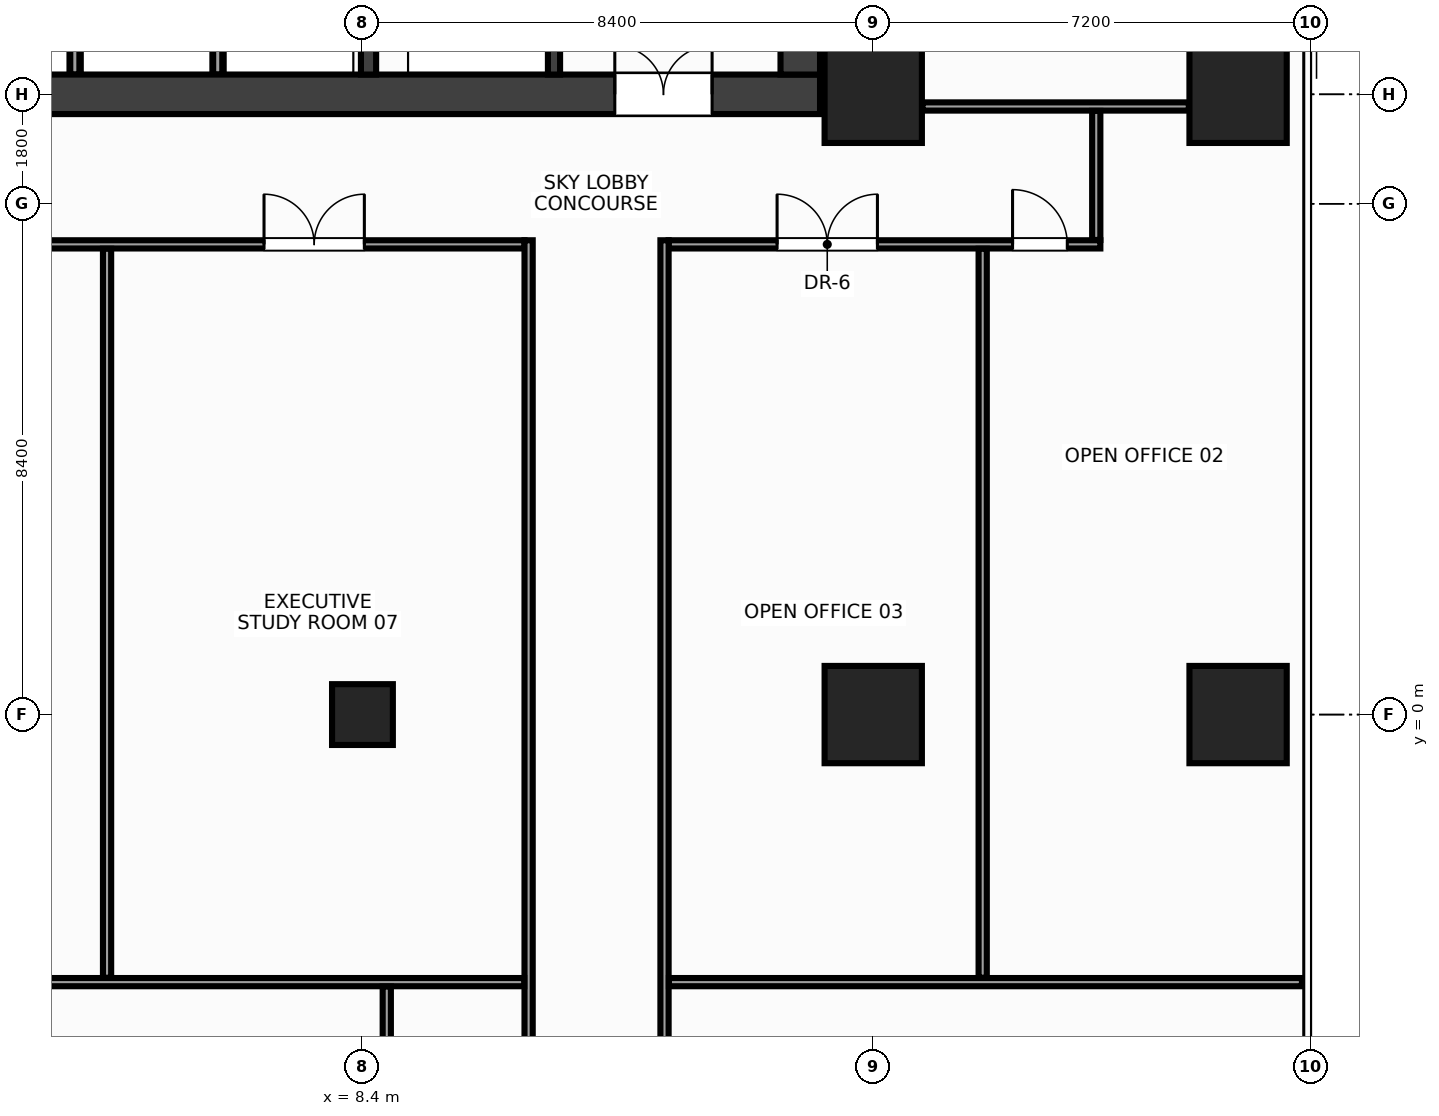
"""IFC4 building model, lengths in metres.
Left out: names, types, materials, properties, quantities, classifications, styles, units other than length and angle.
Written with IfcOpenShell. Run it as: python <this file> out.ifc"""

import sys

from ifc_helpers import new_model, si_unit, direction, frame, frame_2d, origin, origin_2d, place, context, subcontext, project, spatial, rectangle, hollow_rectangle, extrude, source, transform, mapped, element, fill, save


model = new_model("IFC4")
c1 = context("Model", 3, precision=1e-05, world=origin(), true_north=direction((0.0, 1.0)))
c2 = subcontext(c1, "Body", "Model", "MODEL_VIEW")
j1 = project(units=[si_unit("LENGTHUNIT", "METRE"), si_unit("PLANEANGLEUNIT", "RADIAN")], contexts=[c1])
p1 = place(None, origin())
s1 = spatial("IfcSite", under=j1, at=p1, CompositionType="ELEMENT")
p2 = place(p1, origin())
s2 = spatial("IfcBuilding", under=s1, at=p2, CompositionType="ELEMENT")
p3 = place(p2, frame((0.0, 0.0, 131.6)))
s3 = spatial("IfcBuildingStorey", under=s2, at=p3, CompositionType="ELEMENT", Elevation=131.6)
m1 = source(origin(), c2, "Body", "SweptSolid", [
    extrude(rectangle(XDim=31.85, YDim=0.65, at=frame_2d((15.925, 0.0))), origin(), (0.0, 0.0, 1.0), 3.6),
])
p4 = place(p3, frame((-15.925, 10.2, 0.0), z_axis=(0.0, 0.0, 1.0), x_axis=(1.0, 0.0, 0.0)))
e1 = element("IfcWall", 1, at=p4, inside=s3, PredefinedType="SHEAR", context=c2, shape_type="MappedRepresentation", body=[
    mapped(m1, transform((0.0, 0.0, 0.0), x_axis=(1.0, 0.0, 0.0), y_axis=(0.0, 1.0, 0.0), z_axis=(0.0, 0.0, 1.0), scale=1.0)),
])
p5 = place(p4, frame((1.775, 0.0, 0.0)))
e2 = element("IfcOpeningElement", 2, at=p5, cuts=e1, PredefinedType="OPENING", context=c2, shape_type="SweptSolid", body=[
    extrude(rectangle(XDim=1.6, YDim=2.15, at=frame_2d((0.8, 1.075))), frame((0.0, 0.337, 0.0), z_axis=(0.0, -1.0, 0.0), x_axis=(1.0, 0.0, 0.0)), (0.0, 0.0, 1.0), 0.674),
])
p6 = place(p4, frame((28.475, 0.0, 0.0)))
e3 = element("IfcOpeningElement", 3, at=p6, cuts=e1, PredefinedType="OPENING", context=c2, shape_type="SweptSolid", body=[
    extrude(rectangle(XDim=1.6, YDim=2.15, at=frame_2d((0.8, 1.075))), frame((0.0, 0.337, 0.0), z_axis=(0.0, -1.0, 0.0), x_axis=(1.0, 0.0, 0.0)), (0.0, 0.0, 1.0), 0.674),
])
p7 = place(p4, frame((15.175, 0.0, 0.0)))
e4 = element("IfcOpeningElement", 4, at=p7, cuts=e1, PredefinedType="OPENING", context=c2, shape_type="SweptSolid", body=[
    extrude(rectangle(XDim=1.5, YDim=2.2, at=frame_2d((0.75, 1.1))), frame((0.0, 0.337, 0.0), z_axis=(0.0, -1.0, 0.0), x_axis=(1.0, 0.0, 0.0)), (0.0, 0.0, 1.0), 0.674),
])
m2 = source(origin(), c2, "Body", "SweptSolid", [
    extrude(rectangle(XDim=12.95, YDim=0.65, at=frame_2d((6.475, 0.0))), origin(), (0.0, 0.0, 1.0), 3.6),
])
p8 = place(p3, frame((15.6, 10.525, 0.0), z_axis=(0.0, 0.0, 1.0), x_axis=(0.0, 1.0, 0.0)))
e5 = element("IfcWall", 5, at=p8, inside=s3, PredefinedType="SHEAR", context=c2, shape_type="MappedRepresentation", body=[
    mapped(m2, transform((0.0, 0.0, 0.0), x_axis=(1.0, 0.0, 0.0), y_axis=(0.0, 1.0, 0.0), z_axis=(0.0, 0.0, 1.0), scale=1.0)),
])
m3 = source(origin(), c2, "Body", "SweptSolid", [
    extrude(rectangle(XDim=12.95, YDim=0.25, at=frame_2d((6.475, 0.0))), origin(), (0.0, 0.0, 1.0), 3.6),
])
p9 = place(p3, frame((8.5, 10.525, 0.0), z_axis=(0.0, 0.0, 1.0), x_axis=(0.0, 1.0, 0.0)))
e6 = element("IfcWall", 6, at=p9, inside=s3, PredefinedType="SHEAR", context=c2, shape_type="MappedRepresentation", body=[
    mapped(m3, transform((0.0, 0.0, 0.0), x_axis=(1.0, 0.0, 0.0), y_axis=(0.0, 1.0, 0.0), z_axis=(0.0, 0.0, 1.0), scale=1.0)),
])
p10 = place(p9, frame((4.475, 0.0, 0.0)))
e7 = element("IfcOpeningElement", 7, at=p10, cuts=e6, PredefinedType="OPENING", context=c2, shape_type="SweptSolid", body=[
    extrude(rectangle(XDim=1.1, YDim=2.15, at=frame_2d((0.55, 1.075))), frame((0.0, 0.137, 0.0), z_axis=(0.0, -1.0, 0.0), x_axis=(1.0, 0.0, 0.0)), (0.0, 0.0, 1.0), 0.274),
])
p11 = place(p9, frame((7.025, 0.0, 0.0)))
e8 = element("IfcOpeningElement", 8, at=p11, cuts=e6, PredefinedType="OPENING", context=c2, shape_type="SweptSolid", body=[
    extrude(rectangle(XDim=1.1, YDim=2.15, at=frame_2d((0.55, 1.075))), frame((0.0, 0.137, 0.0), z_axis=(0.0, -1.0, 0.0), x_axis=(1.0, 0.0, 0.0)), (0.0, 0.0, 1.0), 0.274),
])
p12 = place(p9, frame((9.925, 0.0, 0.0)))
e9 = element("IfcOpeningElement", 9, at=p12, cuts=e6, PredefinedType="OPENING", context=c2, shape_type="SweptSolid", body=[
    extrude(rectangle(XDim=0.95, YDim=2.15, at=frame_2d((0.475, 1.075))), frame((0.0, 0.137, 0.0), z_axis=(0.0, -1.0, 0.0), x_axis=(1.0, 0.0, 0.0)), (0.0, 0.0, 1.0), 0.274),
])
m4 = source(origin(), c2, "Body", "SweptSolid", [
    extrude(rectangle(XDim=3.125, YDim=0.2, at=frame_2d((1.562, 0.0))), origin(), (0.0, 0.0, 1.0), 3.6),
])
p13 = place(p3, frame((11.55, 10.525, 0.0), z_axis=(0.0, 0.0, 1.0), x_axis=(0.0, 1.0, 0.0)))
e10 = element("IfcWall", 10, at=p13, inside=s3, PredefinedType="SHEAR", context=c2, shape_type="MappedRepresentation", body=[
    mapped(m4, transform((0.0, 0.0, 0.0), x_axis=(1.0, 0.0, 0.0), y_axis=(0.0, 1.0, 0.0), z_axis=(0.0, 0.0, 1.0), scale=1.0)),
])
p14 = place(p13, frame((0.9, 0.0, 0.0)))
e11 = element("IfcOpeningElement", 11, at=p14, cuts=e10, PredefinedType="OPENING", context=c2, shape_type="SweptSolid", body=[
    extrude(rectangle(XDim=1.1, YDim=2.15, at=frame_2d((0.55, 1.075))), frame((0.0, 0.112, 0.0), z_axis=(0.0, -1.0, 0.0), x_axis=(1.0, 0.0, 0.0)), (0.0, 0.0, 1.0), 0.224),
])
m5 = source(origin(), c2, "Body", "SweptSolid", [
    extrude(rectangle(XDim=1.6, YDim=1.6, at=origin_2d()), origin(), (0.0, 0.0, 1.0), 3.6),
])
for number, where, z_axis, x_axis in (
    (12, (16.8, 0.0, 0.0), (0.0, 0.0, 1.0), (1.0, 0.0, 0.0)),
    (13, (16.8, 10.2, 0.0), (0.0, 0.0, 1.0), (1.0, 0.0, 0.0)),
    (14, (22.8, 0.0, 0.0), (0.0, 0.0, 1.0), (1.0, 0.0, 0.0)),
    (15, (22.8, 10.2, 0.0), (0.0, 0.0, 1.0), (1.0, 0.0, 0.0)),
):
    element("IfcColumn", number, at=place(p3, frame(where, z_axis=z_axis, x_axis=x_axis)), inside=s3, PredefinedType="COLUMN", context=c2, shape_type="MappedRepresentation", body=[
        mapped(m5, transform((0.0, 0.0, 0.0), x_axis=(1.0, 0.0, 0.0), y_axis=(0.0, 1.0, 0.0), z_axis=(0.0, 0.0, 1.0), scale=1.0)),
    ])
m6 = source(origin(), c2, "Body", "SweptSolid", [
    extrude(hollow_rectangle(XDim=1.0, YDim=1.0, WallThickness=0.045, at=origin_2d()), origin(), (0.0, 0.0, 1.0), 3.6),
])
p15 = place(p3, frame((8.4, 0.0, 0.0), z_axis=(0.0, 0.0, 1.0), x_axis=(1.0, 0.0, 0.0)))
e16 = element("IfcColumn", 16, at=p15, inside=s3, PredefinedType="COLUMN", context=c2, shape_type="MappedRepresentation", body=[
    mapped(m6, transform((0.0, 0.0, 0.0), x_axis=(1.0, 0.0, 0.0), y_axis=(0.0, 1.0, 0.0), z_axis=(0.0, 0.0, 1.0), scale=1.0)),
])
m7 = source(origin(), c2, "Body", "SweptSolid", [
    extrude(rectangle(XDim=3.415, YDim=0.15, at=frame_2d((1.708, 0.0))), origin(), (0.0, 0.0, 1.0), 3.38),
])
for number, where, z_axis, x_axis in (
    (17, (3.67, 10.525, 0.0), (0.0, 0.0, 1.0), (0.0, 1.0, 0.0)),
    (18, (6.02, 10.525, 0.0), (0.0, 0.0, 1.0), (0.0, 1.0, 0.0)),
):
    element("IfcWall", number, at=place(p3, frame(where, z_axis=z_axis, x_axis=x_axis)), inside=s3, PredefinedType="PARTITIONING", context=c2, shape_type="MappedRepresentation", body=[
        mapped(m7, transform((0.0, 0.0, 0.0), x_axis=(1.0, 0.0, 0.0), y_axis=(0.0, 1.0, 0.0), z_axis=(0.0, 0.0, 1.0), scale=1.0)),
    ])
m8 = source(origin(), c2, "Body", "SweptSolid", [
    extrude(rectangle(XDim=4.38, YDim=0.135, at=frame_2d((2.19, 0.0))), origin(), (0.0, 0.0, 1.0), 2.915),
])
p16 = place(p3, frame((17.61, 10.0, 0.0), z_axis=(0.0, 0.0, 1.0), x_axis=(1.0, 0.0, 0.0)))
e19 = element("IfcWall", 19, at=p16, inside=s3, PredefinedType="PARTITIONING", context=c2, shape_type="MappedRepresentation", body=[
    mapped(m8, transform((0.0, 0.0, 0.0), x_axis=(1.0, 0.0, 0.0), y_axis=(0.0, 1.0, 0.0), z_axis=(0.0, 0.0, 1.0), scale=1.0)),
])
m9 = source(origin(), c2, "Body", "SweptSolid", [
    extrude(rectangle(XDim=31.6, YDim=0.135, at=frame_2d((15.8, 0.0))), origin(), (0.0, 0.0, 1.0), 2.765),
])
p17 = place(p3, frame((-20.535, 7.732, 0.0), z_axis=(0.0, 0.0, 1.0), x_axis=(1.0, 0.0, 0.0)))
e20 = element("IfcWall", 20, at=p17, inside=s3, PredefinedType="PARTITIONING", context=c2, shape_type="MappedRepresentation", body=[
    mapped(m9, transform((0.0, 0.0, 0.0), x_axis=(1.0, 0.0, 0.0), y_axis=(0.0, 1.0, 0.0), z_axis=(0.0, 0.0, 1.0), scale=1.0)),
])
p18 = place(p17, frame((0.644, 0.0, 0.0)))
e21 = element("IfcOpeningElement", 21, at=p18, cuts=e20, PredefinedType="OPENING", context=c2, shape_type="SweptSolid", body=[
    extrude(rectangle(XDim=0.9, YDim=2.15, at=frame_2d((0.45, 1.075))), frame((0.0, 0.08, 0.0), z_axis=(0.0, -1.0, 0.0), x_axis=(1.0, 0.0, 0.0)), (0.0, 0.0, 1.0), 0.159),
])
p19 = place(p17, frame((5.21, 0.0, 0.0)))
e22 = element("IfcOpeningElement", 22, at=p19, cuts=e20, PredefinedType="OPENING", context=c2, shape_type="SweptSolid", body=[
    extrude(rectangle(XDim=1.65, YDim=2.35, at=frame_2d((0.825, 1.175))), frame((0.0, 0.08, 0.0), z_axis=(0.0, -1.0, 0.0), x_axis=(1.0, 0.0, 0.0)), (0.0, 0.0, 1.0), 0.159),
])
p20 = place(p17, frame((11.41, 0.0, 0.0)))
e23 = element("IfcOpeningElement", 23, at=p20, cuts=e20, PredefinedType="OPENING", context=c2, shape_type="SweptSolid", body=[
    extrude(rectangle(XDim=1.65, YDim=2.35, at=frame_2d((0.825, 1.175))), frame((0.0, 0.08, 0.0), z_axis=(0.0, -1.0, 0.0), x_axis=(1.0, 0.0, 0.0)), (0.0, 0.0, 1.0), 0.159),
])
p21 = place(p17, frame((19.91, 0.0, 0.0)))
e24 = element("IfcOpeningElement", 24, at=p21, cuts=e20, PredefinedType="OPENING", context=c2, shape_type="SweptSolid", body=[
    extrude(rectangle(XDim=1.65, YDim=2.35, at=frame_2d((0.825, 1.175))), frame((0.0, 0.08, 0.0), z_axis=(0.0, -1.0, 0.0), x_axis=(1.0, 0.0, 0.0)), (0.0, 0.0, 1.0), 0.159),
])
p22 = place(p17, frame((27.316, 0.0, 0.0)))
e25 = element("IfcOpeningElement", 25, at=p22, cuts=e20, PredefinedType="OPENING", context=c2, shape_type="SweptSolid", body=[
    extrude(rectangle(XDim=1.65, YDim=2.35, at=frame_2d((0.825, 1.175))), frame((0.0, 0.08, 0.0), z_axis=(0.0, -1.0, 0.0), x_axis=(1.0, 0.0, 0.0)), (0.0, 0.0, 1.0), 0.159),
])
m10 = source(origin(), c2, "Body", "SweptSolid", [
    extrude(rectangle(XDim=7.1, YDim=0.135, at=frame_2d((3.55, 0.0))), origin(), (0.0, 0.0, 1.0), 2.765),
])
p23 = place(p3, frame((13.435, 7.732, 0.0), z_axis=(0.0, 0.0, 1.0), x_axis=(1.0, 0.0, 0.0)))
e26 = element("IfcWall", 26, at=p23, inside=s3, PredefinedType="PARTITIONING", context=c2, shape_type="MappedRepresentation", body=[
    mapped(m10, transform((0.0, 0.0, 0.0), x_axis=(1.0, 0.0, 0.0), y_axis=(0.0, 1.0, 0.0), z_axis=(0.0, 0.0, 1.0), scale=1.0)),
])
p24 = place(p23, frame((5.656, 0.0, 0.0)))
e27 = element("IfcOpeningElement", 27, at=p24, cuts=e26, PredefinedType="OPENING", context=c2, shape_type="SweptSolid", body=[
    extrude(rectangle(XDim=0.9, YDim=2.15, at=frame_2d((0.45, 1.075))), frame((0.0, 0.08, 0.0), z_axis=(0.0, -1.0, 0.0), x_axis=(1.0, 0.0, 0.0)), (0.0, 0.0, 1.0), 0.159),
])
p25 = place(p23, frame((1.784, 0.0, 0.0)))
e28 = element("IfcOpeningElement", 28, at=p25, cuts=e26, PredefinedType="OPENING", context=c2, shape_type="SweptSolid", body=[
    extrude(rectangle(XDim=1.65, YDim=2.35, at=frame_2d((0.825, 1.175))), frame((0.0, 0.08, 0.0), z_axis=(0.0, -1.0, 0.0), x_axis=(1.0, 0.0, 0.0)), (0.0, 0.0, 1.0), 0.159),
])
m11 = source(origin(), c2, "Body", "SweptSolid", [
    extrude(rectangle(XDim=2.123, YDim=0.135, at=frame_2d((1.061, 0.0))), origin(), (0.0, 0.0, 1.0), 3.38),
])
p26 = place(p3, frame((20.468, 7.805, 0.0), z_axis=(0.0, 0.0, 1.0), x_axis=(0.0, 1.0, 0.0)))
e29 = element("IfcWall", 29, at=p26, inside=s3, PredefinedType="PARTITIONING", context=c2, shape_type="MappedRepresentation", body=[
    mapped(m11, transform((0.0, 0.0, 0.0), x_axis=(1.0, 0.0, 0.0), y_axis=(0.0, 1.0, 0.0), z_axis=(0.0, 0.0, 1.0), scale=1.0)),
])
m12 = source(origin(), c2, "Body", "SweptSolid", [
    extrude(rectangle(XDim=22.595, YDim=0.135, at=frame_2d((11.297, 0.0))), origin(), (0.0, 0.0, 1.0), 2.665),
])
for number, where, z_axis, x_axis in (
    (30, (11.133, -14.795, 0.0), (0.0, 0.0, 1.0), (0.0, 1.0, 0.0)),
    (31, (13.367, -14.795, 0.0), (0.0, 0.0, 1.0), (0.0, 1.0, 0.0)),
):
    element("IfcWall", number, at=place(p3, frame(where, z_axis=z_axis, x_axis=x_axis)), inside=s3, PredefinedType="PARTITIONING", context=c2, shape_type="MappedRepresentation", body=[
        mapped(m12, transform((0.0, 0.0, 0.0), x_axis=(1.0, 0.0, 0.0), y_axis=(0.0, 1.0, 0.0), z_axis=(0.0, 0.0, 1.0), scale=1.0)),
    ])
m13 = source(origin(), c2, "Body", "SweptSolid", [
    extrude(rectangle(XDim=34.91, YDim=0.135, at=frame_2d((17.455, 0.0))), origin(), (0.0, 0.0, 1.0), 2.765),
])
p27 = place(p3, frame((-23.85, -4.4, 0.0), z_axis=(0.0, 0.0, 1.0), x_axis=(1.0, 0.0, 0.0)))
e32 = element("IfcWall", 32, at=p27, inside=s3, PredefinedType="PARTITIONING", context=c2, shape_type="MappedRepresentation", body=[
    mapped(m13, transform((0.0, 0.0, 0.0), x_axis=(1.0, 0.0, 0.0), y_axis=(0.0, 1.0, 0.0), z_axis=(0.0, 0.0, 1.0), scale=1.0)),
])
p28 = place(p27, frame((1.266, 0.0, 0.0)))
e33 = element("IfcOpeningElement", 33, at=p28, cuts=e32, PredefinedType="OPENING", context=c2, shape_type="SweptSolid", body=[
    extrude(rectangle(XDim=1.65, YDim=2.35, at=frame_2d((0.825, 1.175))), frame((0.0, 0.08, 0.0), z_axis=(0.0, -1.0, 0.0), x_axis=(1.0, 0.0, 0.0)), (0.0, 0.0, 1.0), 0.159),
])
p29 = place(p27, frame((8.725, 0.0, 0.0)))
e34 = element("IfcOpeningElement", 34, at=p29, cuts=e32, PredefinedType="OPENING", context=c2, shape_type="SweptSolid", body=[
    extrude(rectangle(XDim=1.65, YDim=2.35, at=frame_2d((0.825, 1.175))), frame((0.0, 0.08, 0.0), z_axis=(0.0, -1.0, 0.0), x_axis=(1.0, 0.0, 0.0)), (0.0, 0.0, 1.0), 0.159),
])
p30 = place(p27, frame((23.325, 0.0, 0.0)))
e35 = element("IfcOpeningElement", 35, at=p30, cuts=e32, PredefinedType="OPENING", context=c2, shape_type="SweptSolid", body=[
    extrude(rectangle(XDim=1.65, YDim=2.35, at=frame_2d((0.825, 1.175))), frame((0.0, 0.08, 0.0), z_axis=(0.0, -1.0, 0.0), x_axis=(1.0, 0.0, 0.0)), (0.0, 0.0, 1.0), 0.159),
])
m14 = source(origin(), c2, "Body", "SweptSolid", [
    extrude(rectangle(XDim=10.41, YDim=0.135, at=frame_2d((5.205, 0.0))), origin(), (0.0, 0.0, 1.0), 2.765),
])
p31 = place(p3, frame((13.44, -4.4, 0.0), z_axis=(0.0, 0.0, 1.0), x_axis=(1.0, 0.0, 0.0)))
e36 = element("IfcWall", 36, at=p31, inside=s3, PredefinedType="PARTITIONING", context=c2, shape_type="MappedRepresentation", body=[
    mapped(m14, transform((0.0, 0.0, 0.0), x_axis=(1.0, 0.0, 0.0), y_axis=(0.0, 1.0, 0.0), z_axis=(0.0, 0.0, 1.0), scale=1.0)),
])
m15 = source(origin(), c2, "Body", "SweptSolid", [
    extrude(rectangle(XDim=11.987, YDim=0.135, at=frame_2d((5.994, 0.0))), origin(), (0.0, 0.0, 1.0), 2.665),
])
p32 = place(p3, frame((4.2, -4.327, 0.0), z_axis=(0.0, 0.0, 1.0), x_axis=(0.0, 1.0, 0.0)))
e37 = element("IfcWall", 37, at=p32, inside=s3, PredefinedType="PARTITIONING", context=c2, shape_type="MappedRepresentation", body=[
    mapped(m15, transform((0.0, 0.0, 0.0), x_axis=(1.0, 0.0, 0.0), y_axis=(0.0, 1.0, 0.0), z_axis=(0.0, 0.0, 1.0), scale=1.0)),
])
m16 = source(origin(), c2, "Body", "SweptSolid", [
    extrude(rectangle(XDim=11.987, YDim=0.135, at=frame_2d((5.994, 0.0))), origin(), (0.0, 0.0, 1.0), 2.915),
])
p33 = place(p3, frame((18.6, -4.327, 0.0), z_axis=(0.0, 0.0, 1.0), x_axis=(0.0, 1.0, 0.0)))
e38 = element("IfcWall", 38, at=p33, inside=s3, PredefinedType="PARTITIONING", context=c2, shape_type="MappedRepresentation", body=[
    mapped(m16, transform((0.0, 0.0, 0.0), x_axis=(1.0, 0.0, 0.0), y_axis=(0.0, 1.0, 0.0), z_axis=(0.0, 0.0, 1.0), scale=1.0)),
])
m17 = source(origin(), c2, "Body", "SweptSolid", [
    extrude(rectangle(XDim=5.818, YDim=0.135, at=frame_2d((2.909, 0.0))), origin(), (0.0, 0.0, 1.0), 3.38),
])
p34 = place(p3, frame((8.8, -10.29, 0.0), z_axis=(0.0, 0.0, 1.0), x_axis=(0.0, 1.0, 0.0)))
e39 = element("IfcWall", 39, at=p34, inside=s3, PredefinedType="PARTITIONING", context=c2, shape_type="MappedRepresentation", body=[
    mapped(m17, transform((0.0, 0.0, 0.0), x_axis=(1.0, 0.0, 0.0), y_axis=(0.0, 1.0, 0.0), z_axis=(0.0, 0.0, 1.0), scale=1.0)),
])
m18 = source(origin(), c2, "Body", "SweptSolid", [
    extrude(rectangle(XDim=1.6, YDim=2.15, at=frame_2d((0.8, 1.075))), frame((0.0, 0.025, 0.0), z_axis=(0.0, -1.0, 0.0), x_axis=(1.0, 0.0, 0.0)), (0.0, 0.0, 1.0), 0.05),
])
p35 = place(p6, origin())
e40 = element("IfcDoor", 40, at=p35, inside=s3, OperationType="DOUBLE_DOOR_SINGLE_SWING", PredefinedType="DOOR", context=c2, shape_type="MappedRepresentation", body=[
    mapped(m18, transform((0.0, 0.0, 0.0), x_axis=(1.0, 0.0, 0.0), y_axis=(0.0, 1.0, 0.0), z_axis=(0.0, 0.0, 1.0), scale=1.0)),
])
fill(e3, e40)
m19 = source(origin(), c2, "Body", "SweptSolid", [
    extrude(rectangle(XDim=0.9, YDim=2.15, at=frame_2d((0.45, 1.075))), frame((0.0, 0.025, 0.0), z_axis=(0.0, -1.0, 0.0), x_axis=(1.0, 0.0, 0.0)), (0.0, 0.0, 1.0), 0.05),
])
p36 = place(p24, origin())
e41 = element("IfcDoor", 41, at=p36, inside=s3, OperationType="SINGLE_SWING_LEFT", PredefinedType="DOOR", context=c2, shape_type="MappedRepresentation", body=[
    mapped(m19, transform((0.0, 0.0, 0.0), x_axis=(1.0, 0.0, 0.0), y_axis=(0.0, 1.0, 0.0), z_axis=(0.0, 0.0, 1.0), scale=1.0)),
])
fill(e27, e41)
m20 = source(origin(), c2, "Body", "SweptSolid", [
    extrude(rectangle(XDim=1.65, YDim=2.35, at=frame_2d((0.825, 1.175))), frame((0.0, 0.025, 0.0), z_axis=(0.0, -1.0, 0.0), x_axis=(1.0, 0.0, 0.0)), (0.0, 0.0, 1.0), 0.05),
])
p37 = place(p25, origin())
e42 = element("IfcDoor", 42, at=p37, inside=s3, OperationType="DOUBLE_DOOR_SINGLE_SWING", PredefinedType="DOOR", context=c2, shape_type="MappedRepresentation", body=[
    mapped(m20, transform((0.0, 0.0, 0.0), x_axis=(1.0, 0.0, 0.0), y_axis=(0.0, 1.0, 0.0), z_axis=(0.0, 0.0, 1.0), scale=1.0)),
])
fill(e28, e42)
p38 = place(p22, origin())
e43 = element("IfcDoor", 43, at=p38, inside=s3, OperationType="DOUBLE_DOOR_SINGLE_SWING", PredefinedType="DOOR", context=c2, shape_type="MappedRepresentation", body=[
    mapped(m20, transform((0.0, 0.0, 0.0), x_axis=(1.0, 0.0, 0.0), y_axis=(0.0, 1.0, 0.0), z_axis=(0.0, 0.0, 1.0), scale=1.0)),
])
fill(e25, e43)
save(model, sys.argv[1])
